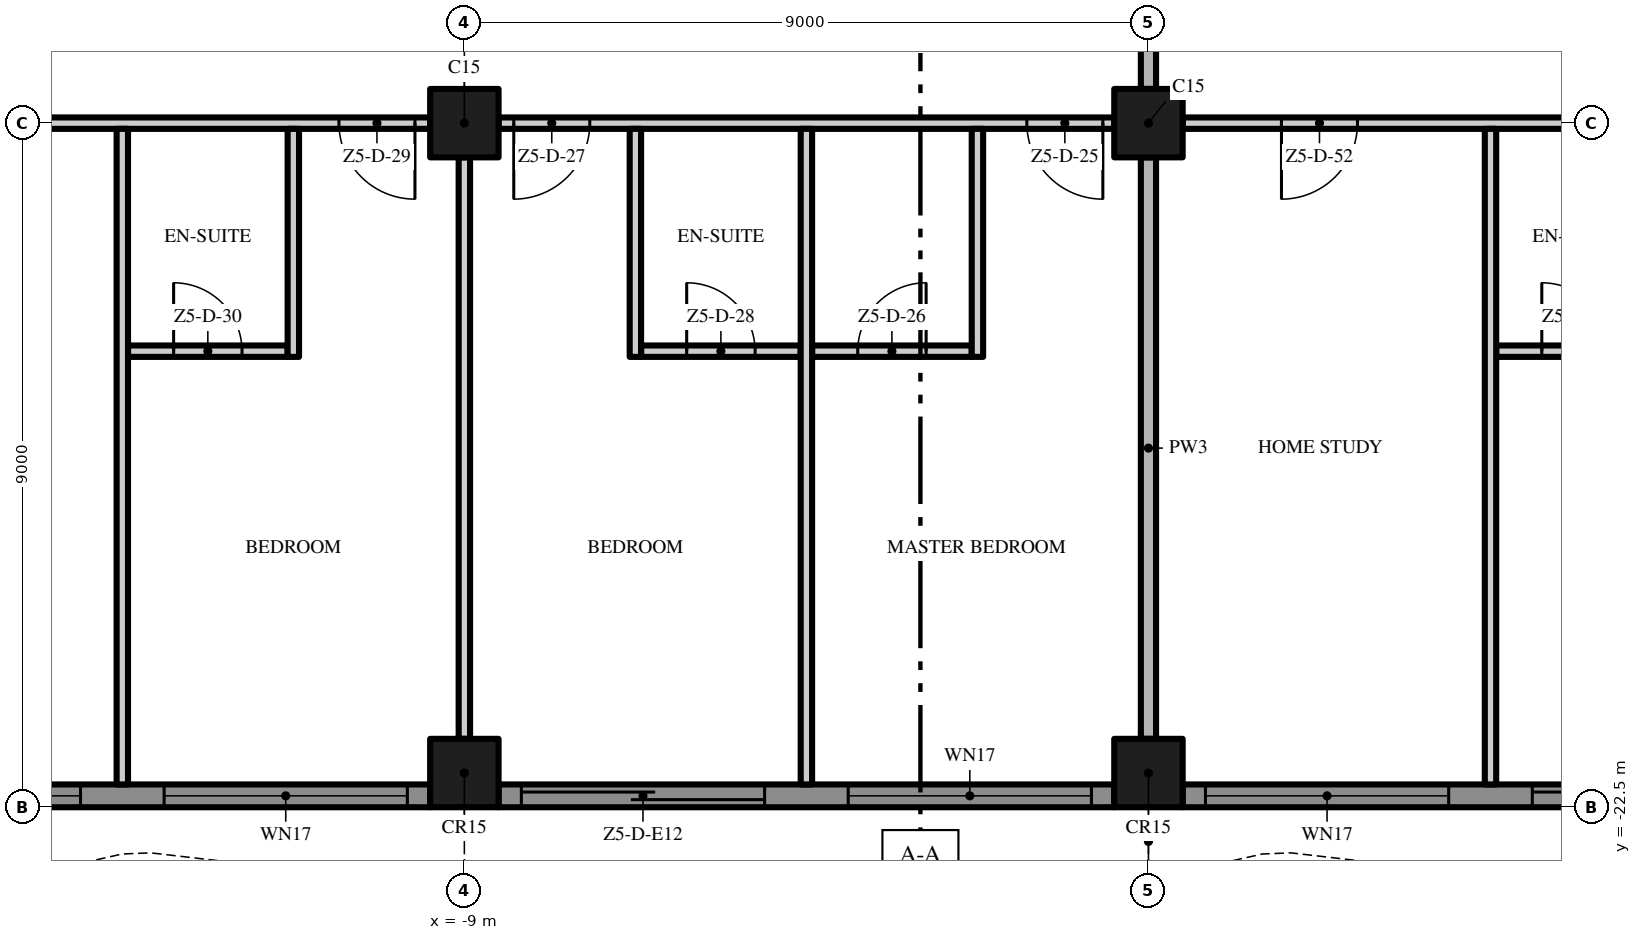
"""IFC4 building model, lengths in metres.
Left out: names, types, materials, properties, quantities, classifications, styles, units other than length and angle.
Written with IfcOpenShell. Run it as: python <this file> out.ifc"""

import sys

from ifc_helpers import new_model, si_unit, direction, frame, frame_2d, origin, origin_2d, place, context, subcontext, project, spatial, polyline, rectangle, outline, extrude, element, fill, save


model = new_model("IFC4")
c1 = context("Model", 3, precision=1e-05, world=origin(), true_north=direction((0.0, 1.0)))
c2 = subcontext(c1, "Body", "Model", "MODEL_VIEW")
j1 = project(units=[si_unit("LENGTHUNIT", "METRE"), si_unit("PLANEANGLEUNIT", "RADIAN")], contexts=[c1])
p1 = place(None, origin())
s1 = spatial("IfcSite", under=j1, at=p1, CompositionType="ELEMENT")
p2 = place(p1, origin())
s2 = spatial("IfcBuilding", under=s1, at=p2, CompositionType="ELEMENT")
p3 = place(p2, frame((0.0, 0.0, 276.8)))
s3 = spatial("IfcBuildingStorey", under=s2, at=p3, CompositionType="ELEMENT", Elevation=276.8)
for number, where, z_axis, x_axis in (
    (1, (-9.0, -13.5, 0.0), (0.0, 0.0, 1.0), (1.0, 0.0, 0.0)),
    (2, (-9.0, -22.05, 0.0), (0.0, 0.0, 1.0), (1.0, 0.0, 0.0)),
    (3, (0.0, -13.5, 0.0), (0.0, 0.0, 1.0), (1.0, 0.0, 0.0)),
    (4, (0.0, -22.05, 0.0), (0.0, 0.0, 1.0), (1.0, 0.0, 0.0)),
):
    element("IfcColumn", number, at=place(p3, frame(where, z_axis=z_axis, x_axis=x_axis)), inside=s3, PredefinedType="COLUMN", context=c2, shape_type="SweptSolid", body=[
        extrude(rectangle(XDim=0.9, YDim=0.9, at=origin_2d()), origin(), (0.0, 0.0, 1.0), 3.5),
    ])
p4 = place(p3, frame((-9.45, -22.35, 0.0), z_axis=(0.0, 0.0, 1.0), x_axis=(-1.0, 0.0, 0.0)))
e5 = element("IfcWall", 5, at=p4, inside=s3, PredefinedType="SOLIDWALL", context=c2, shape_type="SweptSolid", body=[
    extrude(rectangle(XDim=8.1, YDim=0.3, at=frame_2d((4.05, 0.0))), origin(), (0.0, 0.0, 1.0), 3.5),
])
p5 = place(p4, frame((4.6, 0.0, 0.45)))
e6 = element("IfcOpeningElement", 6, at=p5, cuts=e5, PredefinedType="OPENING", context=c2, shape_type="SweptSolid", body=[
    extrude(rectangle(XDim=3.2, YDim=2.65, at=frame_2d((1.6, 1.325))), frame((0.0, 0.16, 0.0), z_axis=(0.0, -1.0, 0.0), x_axis=(1.0, 0.0, 0.0)), (0.0, 0.0, 1.0), 0.32),
])
p6 = place(p4, frame((0.3, 0.0, 0.45)))
e7 = element("IfcOpeningElement", 7, at=p6, cuts=e5, PredefinedType="OPENING", context=c2, shape_type="SweptSolid", body=[
    extrude(rectangle(XDim=3.2, YDim=2.65, at=frame_2d((1.6, 1.325))), frame((0.0, 0.16, 0.0), z_axis=(0.0, -1.0, 0.0), x_axis=(1.0, 0.0, 0.0)), (0.0, 0.0, 1.0), 0.32),
])
p7 = place(p3, frame((-0.45, -22.35, 0.0), z_axis=(0.0, 0.0, 1.0), x_axis=(-1.0, 0.0, 0.0)))
e8 = element("IfcWall", 8, at=p7, inside=s3, PredefinedType="SOLIDWALL", context=c2, shape_type="SweptSolid", body=[
    extrude(rectangle(XDim=8.1, YDim=0.3, at=frame_2d((4.05, 0.0))), origin(), (0.0, 0.0, 1.0), 3.5),
])
p8 = place(p7, frame((4.6, 0.0, 0.0)))
e9 = element("IfcOpeningElement", 9, at=p8, cuts=e8, PredefinedType="OPENING", context=c2, shape_type="SweptSolid", body=[
    extrude(rectangle(XDim=3.2, YDim=2.4, at=frame_2d((1.6, 1.2))), frame((0.0, 0.16, 0.0), z_axis=(0.0, -1.0, 0.0), x_axis=(1.0, 0.0, 0.0)), (0.0, 0.0, 1.0), 0.32),
])
p9 = place(p7, frame((0.3, 0.0, 0.45)))
e10 = element("IfcOpeningElement", 10, at=p9, cuts=e8, PredefinedType="OPENING", context=c2, shape_type="SweptSolid", body=[
    extrude(rectangle(XDim=3.2, YDim=2.65, at=frame_2d((1.6, 1.325))), frame((0.0, 0.16, 0.0), z_axis=(0.0, -1.0, 0.0), x_axis=(1.0, 0.0, 0.0)), (0.0, 0.0, 1.0), 0.32),
])
p10 = place(p3, frame((8.55, -22.35, 0.0), z_axis=(0.0, 0.0, 1.0), x_axis=(-1.0, 0.0, 0.0)))
e11 = element("IfcWall", 11, at=p10, inside=s3, PredefinedType="SOLIDWALL", context=c2, shape_type="SweptSolid", body=[
    extrude(rectangle(XDim=8.1, YDim=0.3, at=frame_2d((4.05, 0.0))), origin(), (0.0, 0.0, 1.0), 3.5),
])
p11 = place(p10, frame((4.6, 0.0, 0.45)))
e12 = element("IfcOpeningElement", 12, at=p11, cuts=e11, PredefinedType="OPENING", context=c2, shape_type="SweptSolid", body=[
    extrude(rectangle(XDim=3.2, YDim=2.65, at=frame_2d((1.6, 1.325))), frame((0.0, 0.16, 0.0), z_axis=(0.0, -1.0, 0.0), x_axis=(1.0, 0.0, 0.0)), (0.0, 0.0, 1.0), 0.32),
])
p12 = place(p10, frame((0.3, 0.0, 0.0)))
e13 = element("IfcOpeningElement", 13, at=p12, cuts=e11, PredefinedType="OPENING", context=c2, shape_type="SweptSolid", body=[
    extrude(rectangle(XDim=3.2, YDim=2.4, at=frame_2d((1.6, 1.2))), frame((0.0, 0.16, 0.0), z_axis=(0.0, -1.0, 0.0), x_axis=(1.0, 0.0, 0.0)), (0.0, 0.0, 1.0), 0.32),
])
p13 = place(p3, origin())
e14 = element("IfcWall", 14, at=p13, inside=s3, PredefinedType="USERDEFINED", context=c2, shape_type="SweptSolid", body=[
    extrude(outline(polyline([(-22.5, -25.149), (-21.0, -25.485), (-20.625, -25.5), (-19.5, -25.369), (-18.0, -24.845), (-16.5, -24.112), (-15.0, -23.451), (-13.5, -23.115), (-13.125, -23.1), (-12.0, -23.231), (-10.5, -23.755), (-9.0, -24.488), (-7.5, -25.149), (-6.0, -25.485), (-5.625, -25.5), (-4.5, -25.369), (-3.0, -24.845), (-1.5, -24.112), (0.0, -23.451), (1.5, -23.115), (1.875, -23.1), (3.0, -23.231), (4.5, -23.755), (6.0, -24.488), (7.5, -25.149), (9.0, -25.485), (9.375, -25.5), (10.5, -25.369), (12.0, -24.845), (13.5, -24.112), (15.0, -23.451), (16.5, -23.115), (16.875, -23.1), (18.0, -23.231), (19.5, -23.755), (21.0, -24.488), (22.5, -25.149), (22.601, -24.92), (21.105, -24.261), (19.596, -23.524), (18.056, -22.986), (16.885, -22.849), (16.467, -22.866), (14.921, -23.213), (13.395, -23.885), (11.904, -24.614), (10.444, -25.124), (9.365, -25.249), (9.033, -25.236), (7.579, -24.91), (6.105, -24.261), (4.596, -23.524), (3.056, -22.986), (1.885, -22.849), (1.467, -22.866), (-0.079, -23.213), (-1.605, -23.885), (-3.096, -24.614), (-4.556, -25.124), (-5.635, -25.249), (-5.967, -25.236), (-7.421, -24.91), (-8.895, -24.261), (-10.404, -23.524), (-11.944, -22.986), (-13.115, -22.849), (-13.533, -22.866), (-15.079, -23.213), (-16.605, -23.885), (-18.096, -24.614), (-19.556, -25.124), (-20.635, -25.249), (-20.967, -25.236), (-22.445, -24.905), (-22.5, -25.149)])), origin(), (0.0, 0.0, 1.0), 0.9),
])
p14 = place(p3, frame((-13.425, -16.5, 0.0), z_axis=(0.0, 0.0, 1.0), x_axis=(1.0, 0.0, 0.0)))
e15 = element("IfcWall", 15, at=p14, inside=s3, PredefinedType="PARTITIONING", context=c2, shape_type="SweptSolid", body=[
    extrude(rectangle(XDim=2.1, YDim=0.15, at=frame_2d((1.05, 0.0))), origin(), (0.0, 0.0, 1.0), 3.5),
])
p15 = place(p14, frame((0.6, 0.0, 0.0)))
e16 = element("IfcOpeningElement", 16, at=p15, cuts=e15, PredefinedType="OPENING", context=c2, shape_type="SweptSolid", body=[
    extrude(rectangle(XDim=0.9, YDim=2.1, at=frame_2d((0.45, 1.05))), frame((0.0, 0.085, 0.0), z_axis=(0.0, -1.0, 0.0), x_axis=(1.0, 0.0, 0.0)), (0.0, 0.0, 1.0), 0.17),
])
p16 = place(p3, frame((-6.675, -16.5, 0.0), z_axis=(0.0, 0.0, 1.0), x_axis=(1.0, 0.0, 0.0)))
e17 = element("IfcWall", 17, at=p16, inside=s3, PredefinedType="PARTITIONING", context=c2, shape_type="SweptSolid", body=[
    extrude(rectangle(XDim=2.1, YDim=0.15, at=frame_2d((1.05, 0.0))), origin(), (0.0, 0.0, 1.0), 3.5),
])
p17 = place(p16, frame((0.6, 0.0, 0.0)))
e18 = element("IfcOpeningElement", 18, at=p17, cuts=e17, PredefinedType="OPENING", context=c2, shape_type="SweptSolid", body=[
    extrude(rectangle(XDim=0.9, YDim=2.1, at=frame_2d((0.45, 1.05))), frame((0.0, 0.085, 0.0), z_axis=(0.0, -1.0, 0.0), x_axis=(1.0, 0.0, 0.0)), (0.0, 0.0, 1.0), 0.17),
])
p18 = place(p3, frame((-4.425, -16.5, 0.0), z_axis=(0.0, 0.0, 1.0), x_axis=(1.0, 0.0, 0.0)))
e19 = element("IfcWall", 19, at=p18, inside=s3, PredefinedType="PARTITIONING", context=c2, shape_type="SweptSolid", body=[
    extrude(rectangle(XDim=2.1, YDim=0.15, at=frame_2d((1.05, 0.0))), origin(), (0.0, 0.0, 1.0), 3.5),
])
p19 = place(p18, frame((0.6, 0.0, 0.0)))
e20 = element("IfcOpeningElement", 20, at=p19, cuts=e19, PredefinedType="OPENING", context=c2, shape_type="SweptSolid", body=[
    extrude(rectangle(XDim=0.9, YDim=2.1, at=frame_2d((0.45, 1.05))), frame((0.0, 0.085, 0.0), z_axis=(0.0, -1.0, 0.0), x_axis=(1.0, 0.0, 0.0)), (0.0, 0.0, 1.0), 0.17),
])
p20 = place(p3, frame((4.575, -16.5, 0.0), z_axis=(0.0, 0.0, 1.0), x_axis=(1.0, 0.0, 0.0)))
e21 = element("IfcWall", 21, at=p20, inside=s3, PredefinedType="PARTITIONING", context=c2, shape_type="SweptSolid", body=[
    extrude(rectangle(XDim=2.1, YDim=0.15, at=frame_2d((1.05, 0.0))), origin(), (0.0, 0.0, 1.0), 3.5),
])
p21 = place(p20, frame((0.6, 0.0, 0.0)))
e22 = element("IfcOpeningElement", 22, at=p21, cuts=e21, PredefinedType="OPENING", context=c2, shape_type="SweptSolid", body=[
    extrude(rectangle(XDim=0.9, YDim=2.1, at=frame_2d((0.45, 1.05))), frame((0.0, 0.085, 0.0), z_axis=(0.0, -1.0, 0.0), x_axis=(1.0, 0.0, 0.0)), (0.0, 0.0, 1.0), 0.17),
])
p22 = place(p3, frame((-9.45, -13.5, 0.0), z_axis=(0.0, 0.0, 1.0), x_axis=(-1.0, 0.0, 0.0)))
e23 = element("IfcWall", 23, at=p22, inside=s3, PredefinedType="PARTITIONING", context=c2, shape_type="SweptSolid", body=[
    extrude(rectangle(XDim=8.1, YDim=0.15, at=frame_2d((4.05, 0.0))), origin(), (0.0, 0.0, 1.0), 3.5),
])
p23 = place(p22, frame((0.2, 0.0, 0.0)))
e24 = element("IfcOpeningElement", 24, at=p23, cuts=e23, PredefinedType="OPENING", context=c2, shape_type="SweptSolid", body=[
    extrude(rectangle(XDim=1.0, YDim=2.4, at=frame_2d((0.5, 1.2))), frame((0.0, 0.085, 0.0), z_axis=(0.0, -1.0, 0.0), x_axis=(1.0, 0.0, 0.0)), (0.0, 0.0, 1.0), 0.17),
])
p24 = place(p22, frame((5.8, 0.0, 0.0)))
e25 = element("IfcOpeningElement", 25, at=p24, cuts=e23, PredefinedType="OPENING", context=c2, shape_type="SweptSolid", body=[
    extrude(rectangle(XDim=1.0, YDim=2.4, at=frame_2d((0.5, 1.2))), frame((0.0, 0.085, 0.0), z_axis=(0.0, -1.0, 0.0), x_axis=(1.0, 0.0, 0.0)), (0.0, 0.0, 1.0), 0.17),
])
p25 = place(p3, frame((-0.45, -13.5, 0.0), z_axis=(0.0, 0.0, 1.0), x_axis=(-1.0, 0.0, 0.0)))
e26 = element("IfcWall", 26, at=p25, inside=s3, PredefinedType="PARTITIONING", context=c2, shape_type="SweptSolid", body=[
    extrude(rectangle(XDim=8.1, YDim=0.15, at=frame_2d((4.05, 0.0))), origin(), (0.0, 0.0, 1.0), 3.5),
])
p26 = place(p25, frame((0.15, 0.0, 0.0)))
e27 = element("IfcOpeningElement", 27, at=p26, cuts=e26, PredefinedType="OPENING", context=c2, shape_type="SweptSolid", body=[
    extrude(rectangle(XDim=1.0, YDim=2.4, at=frame_2d((0.5, 1.2))), frame((0.0, 0.085, 0.0), z_axis=(0.0, -1.0, 0.0), x_axis=(1.0, 0.0, 0.0)), (0.0, 0.0, 1.0), 0.17),
])
p27 = place(p25, frame((6.9, 0.0, 0.0)))
e28 = element("IfcOpeningElement", 28, at=p27, cuts=e26, PredefinedType="OPENING", context=c2, shape_type="SweptSolid", body=[
    extrude(rectangle(XDim=1.0, YDim=2.4, at=frame_2d((0.5, 1.2))), frame((0.0, 0.085, 0.0), z_axis=(0.0, -1.0, 0.0), x_axis=(1.0, 0.0, 0.0)), (0.0, 0.0, 1.0), 0.17),
])
p28 = place(p3, frame((8.55, -13.5, 0.0), z_axis=(0.0, 0.0, 1.0), x_axis=(-1.0, 0.0, 0.0)))
e29 = element("IfcWall", 29, at=p28, inside=s3, PredefinedType="PARTITIONING", context=c2, shape_type="SweptSolid", body=[
    extrude(rectangle(XDim=8.1, YDim=0.15, at=frame_2d((4.05, 0.0))), origin(), (0.0, 0.0, 1.0), 3.5),
])
p29 = place(p28, frame((0.2, 0.0, 0.0)))
e30 = element("IfcOpeningElement", 30, at=p29, cuts=e29, PredefinedType="OPENING", context=c2, shape_type="SweptSolid", body=[
    extrude(rectangle(XDim=1.0, YDim=2.4, at=frame_2d((0.5, 1.2))), frame((0.0, 0.085, 0.0), z_axis=(0.0, -1.0, 0.0), x_axis=(1.0, 0.0, 0.0)), (0.0, 0.0, 1.0), 0.17),
])
p30 = place(p28, frame((5.8, 0.0, 0.0)))
e31 = element("IfcOpeningElement", 31, at=p30, cuts=e29, PredefinedType="OPENING", context=c2, shape_type="SweptSolid", body=[
    extrude(rectangle(XDim=1.0, YDim=2.4, at=frame_2d((0.5, 1.2))), frame((0.0, 0.085, 0.0), z_axis=(0.0, -1.0, 0.0), x_axis=(1.0, 0.0, 0.0)), (0.0, 0.0, 1.0), 0.17),
])
p31 = place(p3, frame((-13.5, -22.2, 0.0), z_axis=(0.0, 0.0, 1.0), x_axis=(0.0, 1.0, 0.0)))
e32 = element("IfcWall", 32, at=p31, inside=s3, PredefinedType="PARTITIONING", context=c2, shape_type="SweptSolid", body=[
    extrude(rectangle(XDim=8.625, YDim=0.15, at=frame_2d((4.312, 0.0))), origin(), (0.0, 0.0, 1.0), 3.5),
])
p32 = place(p3, frame((-11.25, -16.575, 0.0), z_axis=(0.0, 0.0, 1.0), x_axis=(0.0, 1.0, 0.0)))
e33 = element("IfcWall", 33, at=p32, inside=s3, PredefinedType="PARTITIONING", context=c2, shape_type="SweptSolid", body=[
    extrude(rectangle(XDim=3.0, YDim=0.15, at=frame_2d((1.5, 0.0))), origin(), (0.0, 0.0, 1.0), 3.5),
])
p33 = place(p3, frame((-9.0, -21.6, 0.0), z_axis=(0.0, 0.0, 1.0), x_axis=(0.0, 1.0, 0.0)))
e34 = element("IfcWall", 34, at=p33, inside=s3, PredefinedType="PARTITIONING", context=c2, shape_type="SweptSolid", body=[
    extrude(rectangle(XDim=7.65, YDim=0.15, at=frame_2d((3.825, 0.0))), origin(), (0.0, 0.0, 1.0), 3.5),
])
p34 = place(p3, frame((-6.75, -16.575, 0.0), z_axis=(0.0, 0.0, 1.0), x_axis=(0.0, 1.0, 0.0)))
e35 = element("IfcWall", 35, at=p34, inside=s3, PredefinedType="PARTITIONING", context=c2, shape_type="SweptSolid", body=[
    extrude(rectangle(XDim=3.0, YDim=0.15, at=frame_2d((1.5, 0.0))), origin(), (0.0, 0.0, 1.0), 3.5),
])
p35 = place(p3, frame((-4.5, -22.2, 0.0), z_axis=(0.0, 0.0, 1.0), x_axis=(0.0, 1.0, 0.0)))
e36 = element("IfcWall", 36, at=p35, inside=s3, PredefinedType="PARTITIONING", context=c2, shape_type="SweptSolid", body=[
    extrude(rectangle(XDim=8.625, YDim=0.15, at=frame_2d((4.312, 0.0))), origin(), (0.0, 0.0, 1.0), 3.5),
])
p36 = place(p3, frame((-2.25, -16.575, 0.0), z_axis=(0.0, 0.0, 1.0), x_axis=(0.0, 1.0, 0.0)))
e37 = element("IfcWall", 37, at=p36, inside=s3, PredefinedType="PARTITIONING", context=c2, shape_type="SweptSolid", body=[
    extrude(rectangle(XDim=3.0, YDim=0.15, at=frame_2d((1.5, 0.0))), origin(), (0.0, 0.0, 1.0), 3.5),
])
p37 = place(p3, frame((0.0, -21.6, 0.0), z_axis=(0.0, 0.0, 1.0), x_axis=(0.0, 1.0, 0.0)))
e38 = element("IfcWall", 38, at=p37, inside=s3, PredefinedType="PARTITIONING", context=c2, shape_type="SweptSolid", body=[
    extrude(rectangle(XDim=7.65, YDim=0.2, at=frame_2d((3.825, 0.0))), origin(), (0.0, 0.0, 1.0), 3.5),
])
p38 = place(p3, frame((0.0, -13.05, 0.0), z_axis=(0.0, 0.0, 1.0), x_axis=(0.0, 1.0, 0.0)))
e39 = element("IfcWall", 39, at=p38, inside=s3, PredefinedType="PARTITIONING", context=c2, shape_type="SweptSolid", body=[
    extrude(rectangle(XDim=8.1, YDim=0.2, at=frame_2d((4.05, 0.0))), origin(), (0.0, 0.0, 1.0), 3.5),
])
p39 = place(p3, frame((4.5, -22.2, 0.0), z_axis=(0.0, 0.0, 1.0), x_axis=(0.0, 1.0, 0.0)))
e40 = element("IfcWall", 40, at=p39, inside=s3, PredefinedType="PARTITIONING", context=c2, shape_type="SweptSolid", body=[
    extrude(rectangle(XDim=8.625, YDim=0.15, at=frame_2d((4.312, 0.0))), origin(), (0.0, 0.0, 1.0), 3.5),
])
p40 = place(p5, origin())
e41 = element("IfcWindow", 41, at=p40, inside=s3, PartitioningType="SINGLE_PANEL", PredefinedType="WINDOW", context=c2, shape_type="SweptSolid", body=[
    extrude(rectangle(XDim=3.2, YDim=2.65, at=frame_2d((1.6, 1.325))), frame((0.0, 0.03, 0.0), z_axis=(0.0, -1.0, 0.0), x_axis=(1.0, 0.0, 0.0)), (0.0, 0.0, 1.0), 0.06),
])
fill(e6, e41)
p41 = place(p6, origin())
e42 = element("IfcWindow", 42, at=p41, inside=s3, PartitioningType="SINGLE_PANEL", PredefinedType="WINDOW", context=c2, shape_type="SweptSolid", body=[
    extrude(rectangle(XDim=3.2, YDim=2.65, at=frame_2d((1.6, 1.325))), frame((0.0, 0.03, 0.0), z_axis=(0.0, -1.0, 0.0), x_axis=(1.0, 0.0, 0.0)), (0.0, 0.0, 1.0), 0.06),
])
fill(e7, e42)
p42 = place(p8, origin())
e43 = element("IfcDoor", 43, at=p42, inside=s3, OperationType="SINGLE_SWING_LEFT", PredefinedType="DOOR", context=c2, shape_type="SweptSolid", body=[
    extrude(rectangle(XDim=3.2, YDim=2.4, at=frame_2d((1.6, 1.2))), frame((0.0, 0.025, 0.0), z_axis=(0.0, -1.0, 0.0), x_axis=(1.0, 0.0, 0.0)), (0.0, 0.0, 1.0), 0.05),
])
fill(e9, e43)
p43 = place(p9, origin())
e44 = element("IfcWindow", 44, at=p43, inside=s3, PartitioningType="SINGLE_PANEL", PredefinedType="WINDOW", context=c2, shape_type="SweptSolid", body=[
    extrude(rectangle(XDim=3.2, YDim=2.65, at=frame_2d((1.6, 1.325))), frame((0.0, 0.03, 0.0), z_axis=(0.0, -1.0, 0.0), x_axis=(1.0, 0.0, 0.0)), (0.0, 0.0, 1.0), 0.06),
])
fill(e10, e44)
p44 = place(p11, origin())
e45 = element("IfcWindow", 45, at=p44, inside=s3, PartitioningType="SINGLE_PANEL", PredefinedType="WINDOW", context=c2, shape_type="SweptSolid", body=[
    extrude(rectangle(XDim=3.2, YDim=2.65, at=frame_2d((1.6, 1.325))), frame((0.0, 0.03, 0.0), z_axis=(0.0, -1.0, 0.0), x_axis=(1.0, 0.0, 0.0)), (0.0, 0.0, 1.0), 0.06),
])
fill(e12, e45)
p45 = place(p12, origin())
e46 = element("IfcDoor", 46, at=p45, inside=s3, OperationType="SINGLE_SWING_LEFT", PredefinedType="DOOR", context=c2, shape_type="SweptSolid", body=[
    extrude(rectangle(XDim=3.2, YDim=2.4, at=frame_2d((1.6, 1.2))), frame((0.0, 0.025, 0.0), z_axis=(0.0, -1.0, 0.0), x_axis=(1.0, 0.0, 0.0)), (0.0, 0.0, 1.0), 0.05),
])
fill(e13, e46)
p46 = place(p26, origin())
e47 = element("IfcDoor", 47, at=p46, inside=s3, OperationType="SINGLE_SWING_LEFT", PredefinedType="DOOR", context=c2, shape_type="SweptSolid", body=[
    extrude(rectangle(XDim=1.0, YDim=2.4, at=frame_2d((0.5, 1.2))), frame((0.0, 0.025, 0.0), z_axis=(0.0, -1.0, 0.0), x_axis=(1.0, 0.0, 0.0)), (0.0, 0.0, 1.0), 0.05),
])
fill(e27, e47)
p47 = place(p19, origin())
e48 = element("IfcDoor", 48, at=p47, inside=s3, OperationType="SINGLE_SWING_RIGHT", PredefinedType="DOOR", context=c2, shape_type="SweptSolid", body=[
    extrude(rectangle(XDim=0.9, YDim=2.1, at=frame_2d((0.45, 1.05))), frame((0.0, 0.025, 0.0), z_axis=(0.0, -1.0, 0.0), x_axis=(1.0, 0.0, 0.0)), (0.0, 0.0, 1.0), 0.05),
])
fill(e20, e48)
p48 = place(p27, origin())
e49 = element("IfcDoor", 49, at=p48, inside=s3, OperationType="SINGLE_SWING_RIGHT", PredefinedType="DOOR", context=c2, shape_type="SweptSolid", body=[
    extrude(rectangle(XDim=1.0, YDim=2.4, at=frame_2d((0.5, 1.2))), frame((0.0, 0.025, 0.0), z_axis=(0.0, -1.0, 0.0), x_axis=(1.0, 0.0, 0.0)), (0.0, 0.0, 1.0), 0.05),
])
fill(e28, e49)
p49 = place(p17, origin())
e50 = element("IfcDoor", 50, at=p49, inside=s3, OperationType="SINGLE_SWING_LEFT", PredefinedType="DOOR", context=c2, shape_type="SweptSolid", body=[
    extrude(rectangle(XDim=0.9, YDim=2.1, at=frame_2d((0.45, 1.05))), frame((0.0, 0.025, 0.0), z_axis=(0.0, -1.0, 0.0), x_axis=(1.0, 0.0, 0.0)), (0.0, 0.0, 1.0), 0.05),
])
fill(e18, e50)
p50 = place(p23, origin())
e51 = element("IfcDoor", 51, at=p50, inside=s3, OperationType="SINGLE_SWING_LEFT", PredefinedType="DOOR", context=c2, shape_type="SweptSolid", body=[
    extrude(rectangle(XDim=1.0, YDim=2.4, at=frame_2d((0.5, 1.2))), frame((0.0, 0.025, 0.0), z_axis=(0.0, -1.0, 0.0), x_axis=(1.0, 0.0, 0.0)), (0.0, 0.0, 1.0), 0.05),
])
fill(e24, e51)
p51 = place(p15, origin())
e52 = element("IfcDoor", 52, at=p51, inside=s3, OperationType="SINGLE_SWING_LEFT", PredefinedType="DOOR", context=c2, shape_type="SweptSolid", body=[
    extrude(rectangle(XDim=0.9, YDim=2.1, at=frame_2d((0.45, 1.05))), frame((0.0, 0.025, 0.0), z_axis=(0.0, -1.0, 0.0), x_axis=(1.0, 0.0, 0.0)), (0.0, 0.0, 1.0), 0.05),
])
fill(e16, e52)
p52 = place(p21, origin())
e53 = element("IfcDoor", 53, at=p52, inside=s3, OperationType="SINGLE_SWING_LEFT", PredefinedType="DOOR", context=c2, shape_type="SweptSolid", body=[
    extrude(rectangle(XDim=0.9, YDim=2.1, at=frame_2d((0.45, 1.05))), frame((0.0, 0.025, 0.0), z_axis=(0.0, -1.0, 0.0), x_axis=(1.0, 0.0, 0.0)), (0.0, 0.0, 1.0), 0.05),
])
fill(e22, e53)
p53 = place(p30, origin())
e54 = element("IfcDoor", 54, at=p53, inside=s3, OperationType="SINGLE_SWING_RIGHT", PredefinedType="DOOR", context=c2, shape_type="SweptSolid", body=[
    extrude(rectangle(XDim=1.0, YDim=2.4, at=frame_2d((0.5, 1.2))), frame((0.0, 0.025, 0.0), z_axis=(0.0, -1.0, 0.0), x_axis=(1.0, 0.0, 0.0)), (0.0, 0.0, 1.0), 0.05),
])
fill(e31, e54)
save(model, sys.argv[1])
